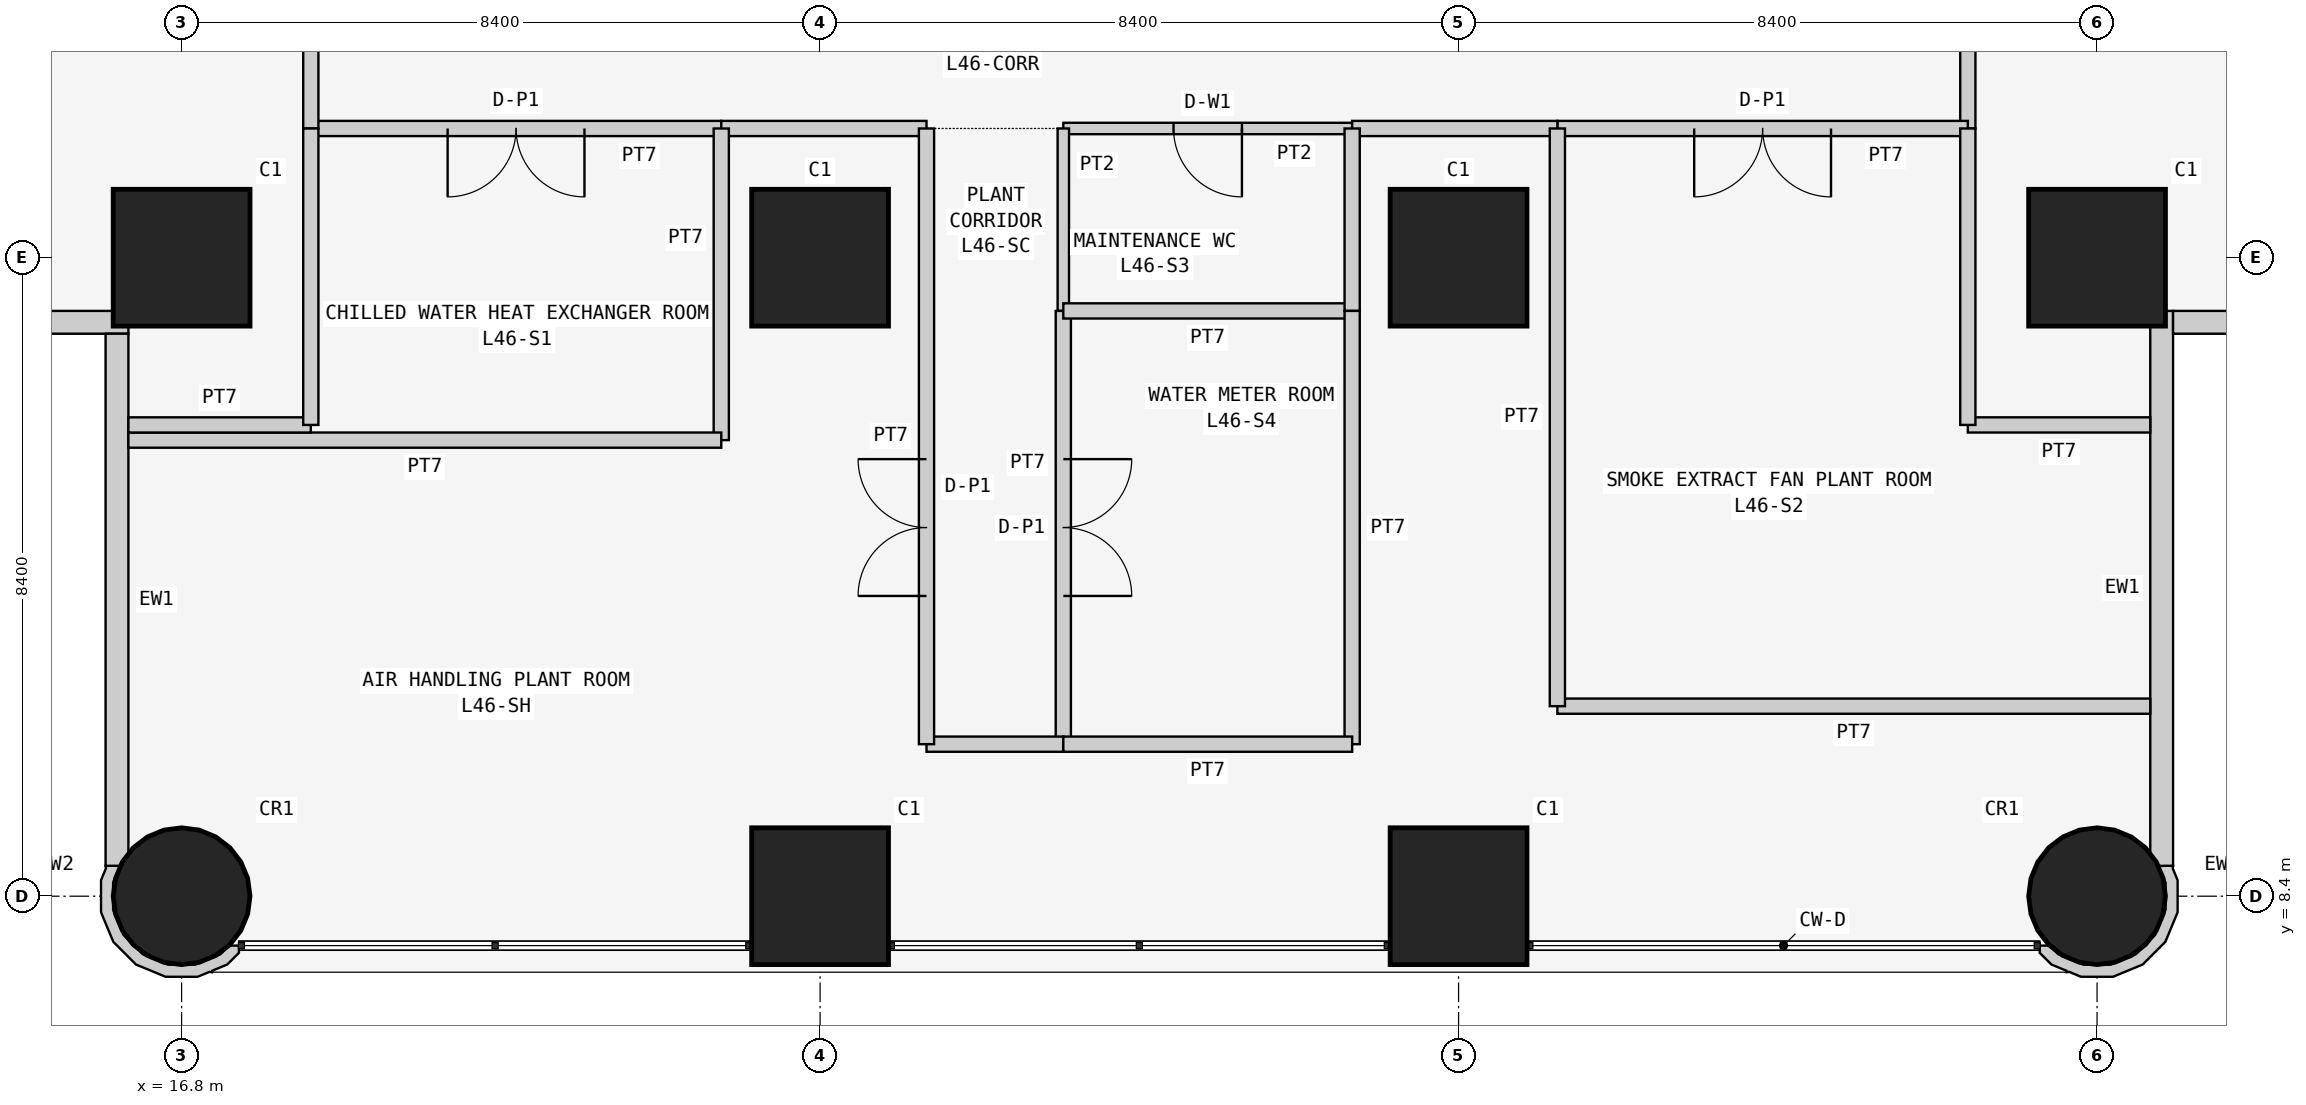
"""IFC4 building model, lengths in metres.
Left out: names, types, materials, properties, quantities, classifications, styles, units other than length and angle.
Written with IfcOpenShell. Run it as: python <this file> out.ifc"""

import sys

from ifc_helpers import new_model, si_unit, direction, frame, frame_2d, origin, origin_2d, place, context, subcontext, project, spatial, polyline, rectangle, circle, outline, extrude, element, fill, save


model = new_model("IFC4")
c1 = context("Model", 3, precision=1e-05, world=origin(), true_north=direction((0.0, 1.0)))
c2 = subcontext(c1, "Body", "Model", "MODEL_VIEW")
j1 = project(units=[si_unit("LENGTHUNIT", "METRE"), si_unit("PLANEANGLEUNIT", "RADIAN")], contexts=[c1])
p1 = place(None, origin())
s1 = spatial("IfcSite", under=j1, at=p1, CompositionType="ELEMENT")
p2 = place(p1, origin())
s2 = spatial("IfcBuilding", under=s1, at=p2, CompositionType="ELEMENT")
p3 = place(p2, frame((0.0, 0.0, 177.3)))
s3 = spatial("IfcBuildingStorey", under=s2, at=p3, CompositionType="ELEMENT", Elevation=177.3)
p4 = place(p3, frame((16.8, 8.4, 0.0), z_axis=(0.0, 0.0, 1.0), x_axis=(1.0, 0.0, 0.0)))
e1 = element("IfcColumn", 1, at=p4, inside=s3, PredefinedType="COLUMN", context=c2, shape_type="SweptSolid", body=[
    extrude(circle(Radius=0.9, at=origin_2d()), origin(), (0.0, 0.0, 1.0), 6.0),
])
for number, where, z_axis, x_axis in (
    (2, (16.8, 16.8, 0.0), (0.0, 0.0, 1.0), (1.0, 0.0, 0.0)),
    (3, (25.2, 8.4, 0.0), (0.0, 0.0, 1.0), (1.0, 0.0, 0.0)),
    (4, (25.2, 16.8, 0.0), (0.0, 0.0, 1.0), (1.0, 0.0, 0.0)),
    (5, (33.6, 8.4, 0.0), (0.0, 0.0, 1.0), (1.0, 0.0, 0.0)),
    (6, (33.6, 16.8, 0.0), (0.0, 0.0, 1.0), (1.0, 0.0, 0.0)),
):
    element("IfcColumn", number, at=place(p3, frame(where, z_axis=z_axis, x_axis=x_axis)), inside=s3, PredefinedType="COLUMN", context=c2, shape_type="SweptSolid", body=[
        extrude(rectangle(XDim=1.8, YDim=1.8, at=origin_2d()), origin(), (0.0, 0.0, 1.0), 6.0),
    ])
p5 = place(p3, frame((42.0, 8.4, 0.0), z_axis=(0.0, 0.0, 1.0), x_axis=(1.0, 0.0, 0.0)))
e7 = element("IfcColumn", 7, at=p5, inside=s3, PredefinedType="COLUMN", context=c2, shape_type="SweptSolid", body=[
    extrude(circle(Radius=0.9, at=origin_2d()), origin(), (0.0, 0.0, 1.0), 6.0),
])
p6 = place(p3, frame((42.0, 16.8, 0.0), z_axis=(0.0, 0.0, 1.0), x_axis=(1.0, 0.0, 0.0)))
e8 = element("IfcColumn", 8, at=p6, inside=s3, PredefinedType="COLUMN", context=c2, shape_type="SweptSolid", body=[
    extrude(rectangle(XDim=1.8, YDim=1.8, at=origin_2d()), origin(), (0.0, 0.0, 1.0), 6.0),
])
p7 = place(p3, frame((0.4, 15.95, 0.0), z_axis=(0.0, 0.0, 1.0), x_axis=(1.0, 0.0, 0.0)))
e9 = element("IfcWall", 9, at=p7, inside=s3, PredefinedType="SOLIDWALL", context=c2, shape_type="SweptSolid", body=[
    extrude(rectangle(XDim=15.7, YDim=0.3, at=frame_2d((7.85, 0.0))), origin(), (0.0, 0.0, 1.0), 5.85),
])
p8 = place(p3, frame((15.95, 15.8, 0.0), z_axis=(0.0, 0.0, 1.0), x_axis=(0.0, -1.0, 0.0)))
e10 = element("IfcWall", 10, at=p8, inside=s3, PredefinedType="SOLIDWALL", context=c2, shape_type="SweptSolid", body=[
    extrude(rectangle(XDim=7.0, YDim=0.3, at=frame_2d((3.5, 0.0))), origin(), (0.0, 0.0, 1.0), 5.85),
])
p9 = place(p3, frame((42.85, 8.8, 0.0), z_axis=(0.0, 0.0, 1.0), x_axis=(0.0, 1.0, 0.0)))
e11 = element("IfcWall", 11, at=p9, inside=s3, PredefinedType="SOLIDWALL", context=c2, shape_type="SweptSolid", body=[
    extrude(rectangle(XDim=7.3, YDim=0.3, at=frame_2d((3.65, 0.0))), origin(), (0.0, 0.0, 1.0), 5.85),
])
p10 = place(p3, frame((43.0, 15.95, 0.0), z_axis=(0.0, 0.0, 1.0), x_axis=(1.0, 0.0, 0.0)))
e12 = element("IfcWall", 12, at=p10, inside=s3, PredefinedType="SOLIDWALL", context=c2, shape_type="SweptSolid", body=[
    extrude(rectangle(XDim=15.4, YDim=0.3, at=frame_2d((7.7, 0.0))), origin(), (0.0, 0.0, 1.0), 5.85),
])
p11 = place(p3, frame((15.89, 8.764, 0.0), z_axis=(0.0, 0.0, 1.0), x_axis=(-0.382241468967, -0.924062475919, 0.0)))
e13 = element("IfcWall", 13, at=p11, inside=s3, PredefinedType="SOLIDWALL", context=c2, shape_type="SweptSolid", body=[
    extrude(outline(polyline([(0.351, 1.805), (0.499, 1.743), (0.753, 1.49), (0.89, 1.159), (0.889, 0.8), (0.752, 0.469), (0.499, 0.216), (0.167, 0.079), (-0.1, 0.079), (0.001, -0.097), (0.031, -0.08), (0.199, -0.08), (0.588, 0.081), (0.887, 0.379), (1.048, 0.769), (1.049, 1.19), (0.887, 1.58), (0.769, 1.699), (0.76, 1.732), (0.741, 1.727), (0.589, 1.878), (0.388, 1.962), (0.301, 1.925), (0.351, 1.805)])), origin(), (0.0, 0.0, 1.0), 5.85),
])
p12 = place(p3, frame((41.303, 7.711, 0.0), z_axis=(0.0, 0.0, 1.0), x_axis=(0.382241468967, -0.924062475919, 0.0)))
e14 = element("IfcWall", 14, at=p12, inside=s3, PredefinedType="SOLIDWALL", context=c2, shape_type="SweptSolid", body=[
    extrude(outline(polyline([(0.23, 1.807), (-0.159, 1.968), (-0.328, 1.968), (-0.357, 1.985), (-0.459, 1.809), (-0.191, 1.809), (0.14, 1.672), (0.394, 1.418), (0.531, 1.087), (0.531, 0.729), (0.394, 0.398), (0.141, 0.144), (-0.008, 0.082), (-0.057, -0.038), (0.03, -0.074), (0.231, 0.009), (0.382, 0.161), (0.402, 0.156), (0.41, 0.188), (0.529, 0.308), (0.69, 0.697), (0.69, 1.119), (0.529, 1.509), (0.23, 1.807)])), origin(), (0.0, 0.0, 1.0), 5.85),
])
p13 = place(p3, frame((40.3, 23.9, 0.0), z_axis=(0.0, 0.0, 1.0), x_axis=(0.0, -1.0, 0.0)))
e15 = element("IfcWall", 15, at=p13, inside=s3, PredefinedType="PARTITIONING", context=c2, shape_type="SweptSolid", body=[
    extrude(rectangle(XDim=5.4, YDim=0.2, at=frame_2d((2.7, 0.0))), origin(), (0.0, 0.0, 1.0), 5.85),
])
p14 = place(p13, frame((1.8, 0.0, 0.0)))
e16 = element("IfcOpeningElement", 16, at=p14, cuts=e15, PredefinedType="OPENING", context=c2, shape_type="SweptSolid", body=[
    extrude(rectangle(XDim=1.8, YDim=2.4, at=frame_2d((0.9, 1.2))), frame((0.0, 0.11, 0.0), z_axis=(0.0, -1.0, 0.0), x_axis=(1.0, 0.0, 0.0)), (0.0, 0.0, 1.0), 0.22),
])
p15 = place(p3, frame((23.9, 18.5, 0.0), z_axis=(0.0, 0.0, 1.0), x_axis=(-1.0, 0.0, 0.0)))
e17 = element("IfcWall", 17, at=p15, inside=s3, PredefinedType="PARTITIONING", context=c2, shape_type="SweptSolid", body=[
    extrude(rectangle(XDim=5.4, YDim=0.2, at=frame_2d((2.7, 0.0))), origin(), (0.0, 0.0, 1.0), 5.85),
])
p16 = place(p15, frame((1.8, 0.0, 0.0)))
e18 = element("IfcOpeningElement", 18, at=p16, cuts=e17, PredefinedType="OPENING", context=c2, shape_type="SweptSolid", body=[
    extrude(rectangle(XDim=1.8, YDim=2.4, at=frame_2d((0.9, 1.2))), frame((0.0, 0.11, 0.0), z_axis=(0.0, -1.0, 0.0), x_axis=(1.0, 0.0, 0.0)), (0.0, 0.0, 1.0), 0.22),
])
p17 = place(p3, frame((40.3, 18.5, 0.0), z_axis=(0.0, 0.0, 1.0), x_axis=(-1.0, 0.0, 0.0)))
e19 = element("IfcWall", 19, at=p17, inside=s3, PredefinedType="PARTITIONING", context=c2, shape_type="SweptSolid", body=[
    extrude(rectangle(XDim=5.4, YDim=0.2, at=frame_2d((2.7, 0.0))), origin(), (0.0, 0.0, 1.0), 5.85),
])
p18 = place(p17, frame((1.8, 0.0, 0.0)))
e20 = element("IfcOpeningElement", 20, at=p18, cuts=e19, PredefinedType="OPENING", context=c2, shape_type="SweptSolid", body=[
    extrude(rectangle(XDim=1.8, YDim=2.4, at=frame_2d((0.9, 1.2))), frame((0.0, 0.11, 0.0), z_axis=(0.0, -1.0, 0.0), x_axis=(1.0, 0.0, 0.0)), (0.0, 0.0, 1.0), 0.22),
])
p19 = place(p3, frame((32.2, 18.5, 0.0), z_axis=(0.0, 0.0, 1.0), x_axis=(-1.0, 0.0, 0.0)))
e21 = element("IfcWall", 21, at=p19, inside=s3, PredefinedType="PARTITIONING", context=c2, shape_type="SweptSolid", body=[
    extrude(rectangle(XDim=3.8, YDim=0.15, at=frame_2d((1.9, 0.0))), origin(), (0.0, 0.0, 1.0), 5.85),
])
p20 = place(p19, frame((1.45, 0.0, 0.0)))
e22 = element("IfcOpeningElement", 22, at=p20, cuts=e21, PredefinedType="OPENING", context=c2, shape_type="SweptSolid", body=[
    extrude(rectangle(XDim=0.9, YDim=2.1, at=frame_2d((0.45, 1.05))), frame((0.0, 0.085, 0.0), z_axis=(0.0, -1.0, 0.0), x_axis=(1.0, 0.0, 0.0)), (0.0, 0.0, 1.0), 0.17),
])
p21 = place(p3, frame((26.6, 18.5, 0.0), z_axis=(0.0, 0.0, 1.0), x_axis=(-1.0, 0.0, 0.0)))
e23 = element("IfcWall", 23, at=p21, inside=s3, PredefinedType="PARTITIONING", context=c2, shape_type="SweptSolid", body=[
    extrude(rectangle(XDim=2.7, YDim=0.2, at=frame_2d((1.35, 0.0))), origin(), (0.0, 0.0, 1.0), 5.85),
])
p22 = place(p3, frame((34.9, 18.5, 0.0), z_axis=(0.0, 0.0, 1.0), x_axis=(-1.0, 0.0, 0.0)))
e24 = element("IfcWall", 24, at=p22, inside=s3, PredefinedType="PARTITIONING", context=c2, shape_type="SweptSolid", body=[
    extrude(rectangle(XDim=2.7, YDim=0.2, at=frame_2d((1.35, 0.0))), origin(), (0.0, 0.0, 1.0), 5.85),
])
p23 = place(p3, frame((18.5, 18.5, 0.0), z_axis=(0.0, 0.0, 1.0), x_axis=(0.0, 1.0, 0.0)))
e25 = element("IfcWall", 25, at=p23, inside=s3, PredefinedType="PARTITIONING", context=c2, shape_type="SweptSolid", body=[
    extrude(rectangle(XDim=5.4, YDim=0.2, at=frame_2d((2.7, 0.0))), origin(), (0.0, 0.0, 1.0), 5.85),
])
p24 = place(p23, frame((1.8, 0.0, 0.0)))
e26 = element("IfcOpeningElement", 26, at=p24, cuts=e25, PredefinedType="OPENING", context=c2, shape_type="SweptSolid", body=[
    extrude(rectangle(XDim=1.8, YDim=2.4, at=frame_2d((0.9, 1.2))), frame((0.0, 0.11, 0.0), z_axis=(0.0, -1.0, 0.0), x_axis=(1.0, 0.0, 0.0)), (0.0, 0.0, 1.0), 0.22),
])
p25 = place(p3, frame((42.7, 14.6, 0.0), z_axis=(0.0, 0.0, 1.0), x_axis=(-1.0, 0.0, 0.0)))
e27 = element("IfcWall", 27, at=p25, inside=s3, PredefinedType="PARTITIONING", context=c2, shape_type="SweptSolid", body=[
    extrude(rectangle(XDim=2.4, YDim=0.2, at=frame_2d((1.2, 0.0))), origin(), (0.0, 0.0, 1.0), 5.85),
])
p26 = place(p3, frame((40.3, 14.6, 0.0), z_axis=(0.0, 0.0, 1.0), x_axis=(0.0, 1.0, 0.0)))
e28 = element("IfcWall", 28, at=p26, inside=s3, PredefinedType="PARTITIONING", context=c2, shape_type="SweptSolid", body=[
    extrude(rectangle(XDim=3.9, YDim=0.2, at=frame_2d((1.95, 0.0))), origin(), (0.0, 0.0, 1.0), 5.85),
])
p27 = place(p3, frame((23.9, 18.5, 0.0), z_axis=(0.0, 0.0, 1.0), x_axis=(0.0, -1.0, 0.0)))
e29 = element("IfcWall", 29, at=p27, inside=s3, PredefinedType="PARTITIONING", context=c2, shape_type="SweptSolid", body=[
    extrude(rectangle(XDim=4.1, YDim=0.2, at=frame_2d((2.05, 0.0))), origin(), (0.0, 0.0, 1.0), 5.85),
])
p28 = place(p3, frame((23.9, 14.4, 0.0), z_axis=(0.0, 0.0, 1.0), x_axis=(-1.0, 0.0, 0.0)))
e30 = element("IfcWall", 30, at=p28, inside=s3, PredefinedType="PARTITIONING", context=c2, shape_type="SweptSolid", body=[
    extrude(rectangle(XDim=7.8, YDim=0.2, at=frame_2d((3.9, 0.0))), origin(), (0.0, 0.0, 1.0), 5.85),
])
p29 = place(p3, frame((16.1, 14.6, 0.0), z_axis=(0.0, 0.0, 1.0), x_axis=(1.0, 0.0, 0.0)))
e31 = element("IfcWall", 31, at=p29, inside=s3, PredefinedType="PARTITIONING", context=c2, shape_type="SweptSolid", body=[
    extrude(rectangle(XDim=2.4, YDim=0.2, at=frame_2d((1.2, 0.0))), origin(), (0.0, 0.0, 1.0), 5.85),
])
p30 = place(p3, frame((18.5, 14.6, 0.0), z_axis=(0.0, 0.0, 1.0), x_axis=(0.0, 1.0, 0.0)))
e32 = element("IfcWall", 32, at=p30, inside=s3, PredefinedType="PARTITIONING", context=c2, shape_type="SweptSolid", body=[
    extrude(rectangle(XDim=3.9, YDim=0.2, at=frame_2d((1.95, 0.0))), origin(), (0.0, 0.0, 1.0), 5.85),
])
p31 = place(p3, frame((42.7, 10.9, 0.0), z_axis=(0.0, 0.0, 1.0), x_axis=(-1.0, 0.0, 0.0)))
e33 = element("IfcWall", 33, at=p31, inside=s3, PredefinedType="PARTITIONING", context=c2, shape_type="SweptSolid", body=[
    extrude(rectangle(XDim=7.8, YDim=0.2, at=frame_2d((3.9, 0.0))), origin(), (0.0, 0.0, 1.0), 5.85),
])
p32 = place(p3, frame((34.9, 10.9, 0.0), z_axis=(0.0, 0.0, 1.0), x_axis=(0.0, 1.0, 0.0)))
e34 = element("IfcWall", 34, at=p32, inside=s3, PredefinedType="PARTITIONING", context=c2, shape_type="SweptSolid", body=[
    extrude(rectangle(XDim=7.6, YDim=0.2, at=frame_2d((3.8, 0.0))), origin(), (0.0, 0.0, 1.0), 5.85),
])
p33 = place(p3, frame((28.4, 18.5, 0.0), z_axis=(0.0, 0.0, 1.0), x_axis=(0.0, -1.0, 0.0)))
e35 = element("IfcWall", 35, at=p33, inside=s3, PredefinedType="PARTITIONING", context=c2, shape_type="SweptSolid", body=[
    extrude(rectangle(XDim=2.4, YDim=0.15, at=frame_2d((1.2, 0.0))), origin(), (0.0, 0.0, 1.0), 5.85),
])
p34 = place(p3, frame((28.4, 16.1, 0.0), z_axis=(0.0, 0.0, 1.0), x_axis=(0.0, -1.0, 0.0)))
e36 = element("IfcWall", 36, at=p34, inside=s3, PredefinedType="PARTITIONING", context=c2, shape_type="SweptSolid", body=[
    extrude(rectangle(XDim=5.7, YDim=0.2, at=frame_2d((2.85, 0.0))), origin(), (0.0, 0.0, 1.0), 5.85),
])
p35 = place(p34, frame((1.95, 0.0, 0.0)))
e37 = element("IfcOpeningElement", 37, at=p35, cuts=e36, PredefinedType="OPENING", context=c2, shape_type="SweptSolid", body=[
    extrude(rectangle(XDim=1.8, YDim=2.4, at=frame_2d((0.9, 1.2))), frame((0.0, 0.11, 0.0), z_axis=(0.0, -1.0, 0.0), x_axis=(1.0, 0.0, 0.0)), (0.0, 0.0, 1.0), 0.22),
])
p36 = place(p3, frame((28.4, 10.4, 0.0), z_axis=(0.0, 0.0, 1.0), x_axis=(-1.0, 0.0, 0.0)))
e38 = element("IfcWall", 38, at=p36, inside=s3, PredefinedType="PARTITIONING", context=c2, shape_type="SweptSolid", body=[
    extrude(rectangle(XDim=1.8, YDim=0.2, at=frame_2d((0.9, 0.0))), origin(), (0.0, 0.0, 1.0), 5.85),
])
p37 = place(p3, frame((26.6, 10.4, 0.0), z_axis=(0.0, 0.0, 1.0), x_axis=(0.0, 1.0, 0.0)))
e39 = element("IfcWall", 39, at=p37, inside=s3, PredefinedType="PARTITIONING", context=c2, shape_type="SweptSolid", body=[
    extrude(rectangle(XDim=8.1, YDim=0.2, at=frame_2d((4.05, 0.0))), origin(), (0.0, 0.0, 1.0), 5.85),
])
p38 = place(p37, frame((1.95, 0.0, 0.0)))
e40 = element("IfcOpeningElement", 40, at=p38, cuts=e39, PredefinedType="OPENING", context=c2, shape_type="SweptSolid", body=[
    extrude(rectangle(XDim=1.8, YDim=2.4, at=frame_2d((0.9, 1.2))), frame((0.0, 0.11, 0.0), z_axis=(0.0, -1.0, 0.0), x_axis=(1.0, 0.0, 0.0)), (0.0, 0.0, 1.0), 0.22),
])
p39 = place(p3, frame((32.2, 16.1, 0.0), z_axis=(0.0, 0.0, 1.0), x_axis=(-1.0, 0.0, 0.0)))
e41 = element("IfcWall", 41, at=p39, inside=s3, PredefinedType="PARTITIONING", context=c2, shape_type="SweptSolid", body=[
    extrude(rectangle(XDim=3.8, YDim=0.2, at=frame_2d((1.9, 0.0))), origin(), (0.0, 0.0, 1.0), 5.85),
])
p40 = place(p3, frame((32.2, 18.5, 0.0), z_axis=(0.0, 0.0, 1.0), x_axis=(0.0, -1.0, 0.0)))
e42 = element("IfcWall", 42, at=p40, inside=s3, PredefinedType="PARTITIONING", context=c2, shape_type="SweptSolid", body=[
    extrude(rectangle(XDim=2.4, YDim=0.2, at=frame_2d((1.2, 0.0))), origin(), (0.0, 0.0, 1.0), 5.85),
])
p41 = place(p3, frame((32.2, 16.1, 0.0), z_axis=(0.0, 0.0, 1.0), x_axis=(0.0, -1.0, 0.0)))
e43 = element("IfcWall", 43, at=p41, inside=s3, PredefinedType="PARTITIONING", context=c2, shape_type="SweptSolid", body=[
    extrude(rectangle(XDim=5.7, YDim=0.2, at=frame_2d((2.85, 0.0))), origin(), (0.0, 0.0, 1.0), 5.85),
])
p42 = place(p3, frame((32.2, 10.4, 0.0), z_axis=(0.0, 0.0, 1.0), x_axis=(-1.0, 0.0, 0.0)))
e44 = element("IfcWall", 44, at=p42, inside=s3, PredefinedType="PARTITIONING", context=c2, shape_type="SweptSolid", body=[
    extrude(rectangle(XDim=3.8, YDim=0.2, at=frame_2d((1.9, 0.0))), origin(), (0.0, 0.0, 1.0), 5.85),
])
p43 = place(p16, origin())
e45 = element("IfcDoor", 45, at=p43, inside=s3, OperationType="DOUBLE_DOOR_SINGLE_SWING", PredefinedType="DOOR", context=c2, shape_type="SweptSolid", body=[
    extrude(rectangle(XDim=1.8, YDim=2.4, at=frame_2d((0.9, 1.2))), frame((0.0, 0.025, 0.0), z_axis=(0.0, -1.0, 0.0), x_axis=(1.0, 0.0, 0.0)), (0.0, 0.0, 1.0), 0.05),
])
fill(e18, e45)
p44 = place(p18, origin())
e46 = element("IfcDoor", 46, at=p44, inside=s3, OperationType="DOUBLE_DOOR_SINGLE_SWING", PredefinedType="DOOR", context=c2, shape_type="SweptSolid", body=[
    extrude(rectangle(XDim=1.8, YDim=2.4, at=frame_2d((0.9, 1.2))), frame((0.0, 0.025, 0.0), z_axis=(0.0, -1.0, 0.0), x_axis=(1.0, 0.0, 0.0)), (0.0, 0.0, 1.0), 0.05),
])
fill(e20, e46)
p45 = place(p20, origin())
e47 = element("IfcDoor", 47, at=p45, inside=s3, OperationType="SINGLE_SWING_LEFT", PredefinedType="DOOR", context=c2, shape_type="SweptSolid", body=[
    extrude(rectangle(XDim=0.9, YDim=2.1, at=frame_2d((0.45, 1.05))), frame((0.0, 0.025, 0.0), z_axis=(0.0, -1.0, 0.0), x_axis=(1.0, 0.0, 0.0)), (0.0, 0.0, 1.0), 0.05),
])
fill(e22, e47)
p46 = place(p35, origin())
e48 = element("IfcDoor", 48, at=p46, inside=s3, OperationType="DOUBLE_DOOR_SINGLE_SWING", PredefinedType="DOOR", context=c2, shape_type="SweptSolid", body=[
    extrude(rectangle(XDim=1.8, YDim=2.4, at=frame_2d((0.9, 1.2))), frame((0.0, 0.025, 0.0), z_axis=(0.0, -1.0, 0.0), x_axis=(1.0, 0.0, 0.0)), (0.0, 0.0, 1.0), 0.05),
])
fill(e37, e48)
p47 = place(p38, origin())
e49 = element("IfcDoor", 49, at=p47, inside=s3, OperationType="DOUBLE_DOOR_SINGLE_SWING", PredefinedType="DOOR", context=c2, shape_type="SweptSolid", body=[
    extrude(rectangle(XDim=1.8, YDim=2.4, at=frame_2d((0.9, 1.2))), frame((0.0, 0.025, 0.0), z_axis=(0.0, -1.0, 0.0), x_axis=(1.0, 0.0, 0.0)), (0.0, 0.0, 1.0), 0.05),
])
fill(e40, e49)
save(model, sys.argv[1])
